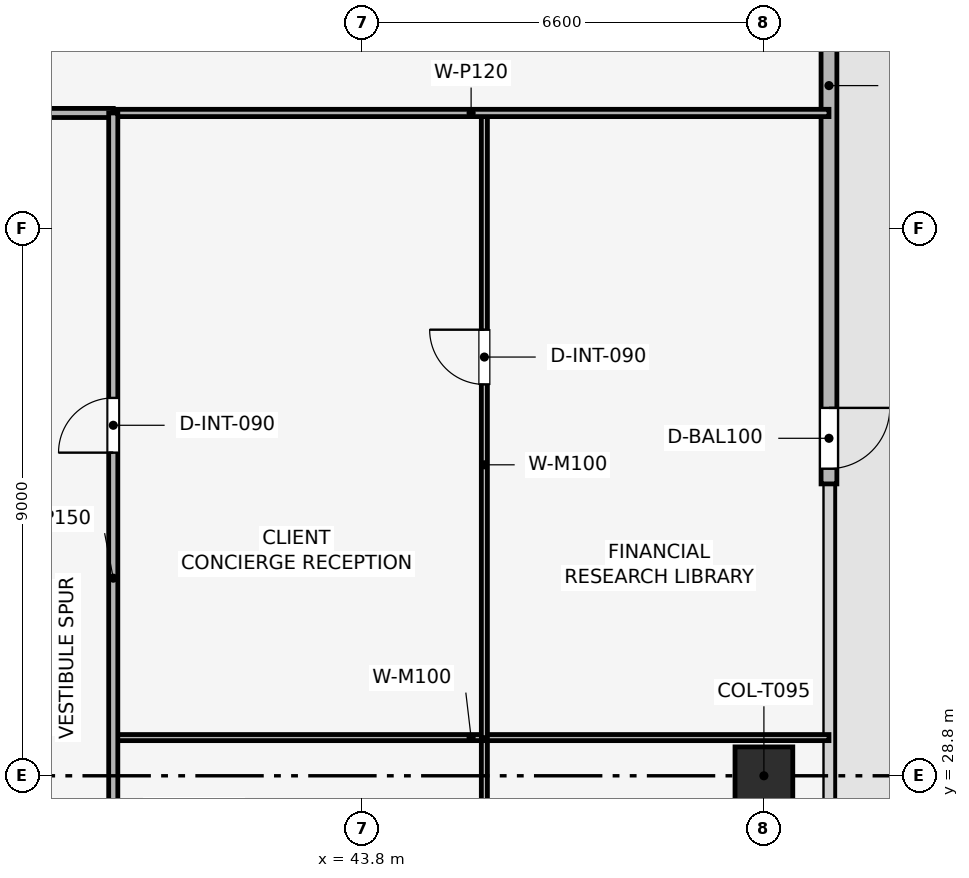
"""IFC4 building model, lengths in metres.
Left out: names, types, materials, properties, quantities, classifications, styles, units other than length and angle.
Written with IfcOpenShell. Run it as: python <this file> out.ifc"""

import sys

from ifc_helpers import new_model, si_unit, direction, frame, frame_2d, origin, origin_2d, place, context, subcontext, project, spatial, rectangle, extrude, element, fill, save


model = new_model("IFC4")
c1 = context("Model", 3, precision=1e-05, world=origin(), true_north=direction((0.0, 1.0)))
c2 = subcontext(c1, "Body", "Model", "MODEL_VIEW")
j1 = project(units=[si_unit("LENGTHUNIT", "METRE"), si_unit("PLANEANGLEUNIT", "RADIAN")], contexts=[c1])
p1 = place(None, origin())
s1 = spatial("IfcSite", under=j1, at=p1, CompositionType="ELEMENT")
p2 = place(p1, origin())
s2 = spatial("IfcBuilding", under=s1, at=p2, CompositionType="ELEMENT")
p3 = place(p2, frame((0.0, 0.0, 321.75)))
s3 = spatial("IfcBuildingStorey", under=s2, at=p3, CompositionType="ELEMENT", Elevation=321.75)
p4 = place(p3, frame((50.4, 28.8, 0.003), z_axis=(0.0, 0.0, 1.0), x_axis=(1.0, 0.0, 0.0)))
e1 = element("IfcColumn", 1, at=p4, inside=s3, PredefinedType="COLUMN", context=c2, shape_type="SweptSolid", body=[
    extrude(rectangle(XDim=0.95, YDim=0.95, at=origin_2d()), origin(), (0.0, 0.0, 1.0), 3.504),
])
p5 = place(p3, frame((51.47, 45.3, 0.0), z_axis=(0.0, 0.0, 1.0), x_axis=(0.0, -1.0, 0.0)))
e2 = element("IfcWall", 2, at=p5, inside=s3, PredefinedType="SOLIDWALL", context=c2, shape_type="SweptSolid", body=[
    extrude(rectangle(XDim=11.7, YDim=0.26, at=frame_2d((5.85, 0.0))), origin(), (0.0, 0.0, 1.0), 3.51),
])
p6 = place(p5, frame((10.45, 0.0, 0.0)))
e3 = element("IfcOpeningElement", 3, at=p6, cuts=e2, PredefinedType="OPENING", context=c2, shape_type="SweptSolid", body=[
    extrude(rectangle(XDim=1.0, YDim=2.2, at=frame_2d((0.5, 1.1))), frame((0.0, 0.14, 0.0), z_axis=(0.0, -1.0, 0.0), x_axis=(1.0, 0.0, 0.0)), (0.0, 0.0, 1.0), 0.28),
])
p7 = place(p3, frame((45.803, 24.4, 0.0), z_axis=(0.0, 0.0, 1.0), x_axis=(0.0, 1.0, 0.0)))
e4 = element("IfcWall", 4, at=p7, inside=s3, PredefinedType="MOVABLE", context=c2, shape_type="SweptSolid", body=[
    extrude(rectangle(XDim=5.028, YDim=0.1, at=frame_2d((2.514, 0.0))), origin(), (0.0, 0.0, 1.0), 3.095),
])
p8 = place(p7, frame((0.2, 0.0, 0.0)))
e5 = element("IfcOpeningElement", 5, at=p8, cuts=e4, PredefinedType="OPENING", context=c2, shape_type="SweptSolid", body=[
    extrude(rectangle(XDim=0.9, YDim=2.1, at=frame_2d((0.45, 1.05))), frame((0.0, 0.06, 0.0), z_axis=(0.0, -1.0, 0.0), x_axis=(1.0, 0.0, 0.0)), (0.0, 0.0, 1.0), 0.12),
])
p9 = place(p3, frame((39.7, 29.428, 0.0), z_axis=(0.0, 0.0, 1.0), x_axis=(1.0, 0.0, 0.0)))
e6 = element("IfcWall", 6, at=p9, inside=s3, PredefinedType="MOVABLE", context=c2, shape_type="SweptSolid", body=[
    extrude(rectangle(XDim=11.77, YDim=0.1, at=frame_2d((5.885, 0.0))), origin(), (0.0, 0.0, 1.0), 3.135),
])
p10 = place(p3, frame((45.803, 29.428, 0.0), z_axis=(0.0, 0.0, 1.0), x_axis=(0.0, 1.0, 0.0)))
e7 = element("IfcWall", 7, at=p10, inside=s3, PredefinedType="MOVABLE", context=c2, shape_type="SweptSolid", body=[
    extrude(rectangle(XDim=10.272, YDim=0.1, at=frame_2d((5.136, 0.0))), origin(), (0.0, 0.0, 1.0), 3.095),
])
p11 = place(p10, frame((5.808, 0.0, 0.0)))
e8 = element("IfcOpeningElement", 8, at=p11, cuts=e7, PredefinedType="OPENING", context=c2, shape_type="SweptSolid", body=[
    extrude(rectangle(XDim=0.9, YDim=2.1, at=frame_2d((0.45, 1.05))), frame((0.0, 0.06, 0.0), z_axis=(0.0, -1.0, 0.0), x_axis=(1.0, 0.0, 0.0)), (0.0, 0.0, 1.0), 0.12),
])
p12 = place(p3, frame((39.7, 39.7, 0.0), z_axis=(0.0, 0.0, 1.0), x_axis=(1.0, 0.0, 0.0)))
e9 = element("IfcWall", 9, at=p12, inside=s3, PredefinedType="PARTITIONING", context=c2, shape_type="SweptSolid", body=[
    extrude(rectangle(XDim=11.77, YDim=0.12, at=frame_2d((5.885, 0.0))), origin(), (0.0, 0.0, 1.0), 3.095),
])
p13 = place(p3, frame((17.9, 39.7, 0.0), z_axis=(0.0, 0.0, 1.0), x_axis=(1.0, 0.0, 0.0)))
e10 = element("IfcWall", 10, at=p13, inside=s3, PredefinedType="PARTITIONING", context=c2, shape_type="SweptSolid", body=[
    extrude(rectangle(XDim=21.8, YDim=0.15, at=frame_2d((10.9, 0.0))), origin(), (0.0, 0.0, 1.0), 3.095),
])
p14 = place(p13, frame((1.302, 0.0, 0.0)))
e11 = element("IfcOpeningElement", 11, at=p14, cuts=e10, PredefinedType="OPENING", context=c2, shape_type="SweptSolid", body=[
    extrude(rectangle(XDim=0.9, YDim=2.1, at=frame_2d((0.45, 1.05))), frame((0.0, 0.085, 0.0), z_axis=(0.0, -1.0, 0.0), x_axis=(1.0, 0.0, 0.0)), (0.0, 0.0, 1.0), 0.17),
])
p15 = place(p13, frame((12.202, 0.0, 0.0)))
e12 = element("IfcOpeningElement", 12, at=p15, cuts=e10, PredefinedType="OPENING", context=c2, shape_type="SweptSolid", body=[
    extrude(rectangle(XDim=0.9, YDim=2.1, at=frame_2d((0.45, 1.05))), frame((0.0, 0.085, 0.0), z_axis=(0.0, -1.0, 0.0), x_axis=(1.0, 0.0, 0.0)), (0.0, 0.0, 1.0), 0.17),
])
p16 = place(p3, frame((39.7, 24.4, 0.0), z_axis=(0.0, 0.0, 1.0), x_axis=(0.0, 1.0, 0.0)))
e13 = element("IfcWall", 13, at=p16, inside=s3, PredefinedType="PARTITIONING", context=c2, shape_type="SweptSolid", body=[
    extrude(rectangle(XDim=15.3, YDim=0.15, at=frame_2d((7.65, 0.0))), origin(), (0.0, 0.0, 1.0), 3.095),
])
p17 = place(p16, frame((2.064, 0.0, 0.0)))
e14 = element("IfcOpeningElement", 14, at=p17, cuts=e13, PredefinedType="OPENING", context=c2, shape_type="SweptSolid", body=[
    extrude(rectangle(XDim=0.9, YDim=2.1, at=frame_2d((0.45, 1.05))), frame((0.0, 0.085, 0.0), z_axis=(0.0, -1.0, 0.0), x_axis=(1.0, 0.0, 0.0)), (0.0, 0.0, 1.0), 0.17),
])
p18 = place(p16, frame((9.714, 0.0, 0.0)))
e15 = element("IfcOpeningElement", 15, at=p18, cuts=e13, PredefinedType="OPENING", context=c2, shape_type="SweptSolid", body=[
    extrude(rectangle(XDim=0.9, YDim=2.1, at=frame_2d((0.45, 1.05))), frame((0.0, 0.085, 0.0), z_axis=(0.0, -1.0, 0.0), x_axis=(1.0, 0.0, 0.0)), (0.0, 0.0, 1.0), 0.17),
])
p19 = place(p6, origin())
e16 = element("IfcDoor", 16, at=p19, inside=s3, OperationType="SINGLE_SWING_LEFT", PredefinedType="DOOR", context=c2, shape_type="SweptSolid", body=[
    extrude(rectangle(XDim=1.0, YDim=2.2, at=frame_2d((0.5, 1.1))), frame((0.0, 0.025, 0.0), z_axis=(0.0, -1.0, 0.0), x_axis=(1.0, 0.0, 0.0)), (0.0, 0.0, 1.0), 0.05),
])
fill(e3, e16)
p20 = place(p11, origin())
e17 = element("IfcDoor", 17, at=p20, inside=s3, OperationType="SINGLE_SWING_RIGHT", PredefinedType="DOOR", context=c2, shape_type="SweptSolid", body=[
    extrude(rectangle(XDim=0.9, YDim=2.1, at=frame_2d((0.45, 1.05))), frame((0.0, 0.025, 0.0), z_axis=(0.0, -1.0, 0.0), x_axis=(1.0, 0.0, 0.0)), (0.0, 0.0, 1.0), 0.05),
])
fill(e8, e17)
p21 = place(p18, origin())
e18 = element("IfcDoor", 18, at=p21, inside=s3, OperationType="SINGLE_SWING_LEFT", PredefinedType="DOOR", context=c2, shape_type="SweptSolid", body=[
    extrude(rectangle(XDim=0.9, YDim=2.1, at=frame_2d((0.45, 1.05))), frame((0.0, 0.025, 0.0), z_axis=(0.0, -1.0, 0.0), x_axis=(1.0, 0.0, 0.0)), (0.0, 0.0, 1.0), 0.05),
])
fill(e15, e18)
save(model, sys.argv[1])
